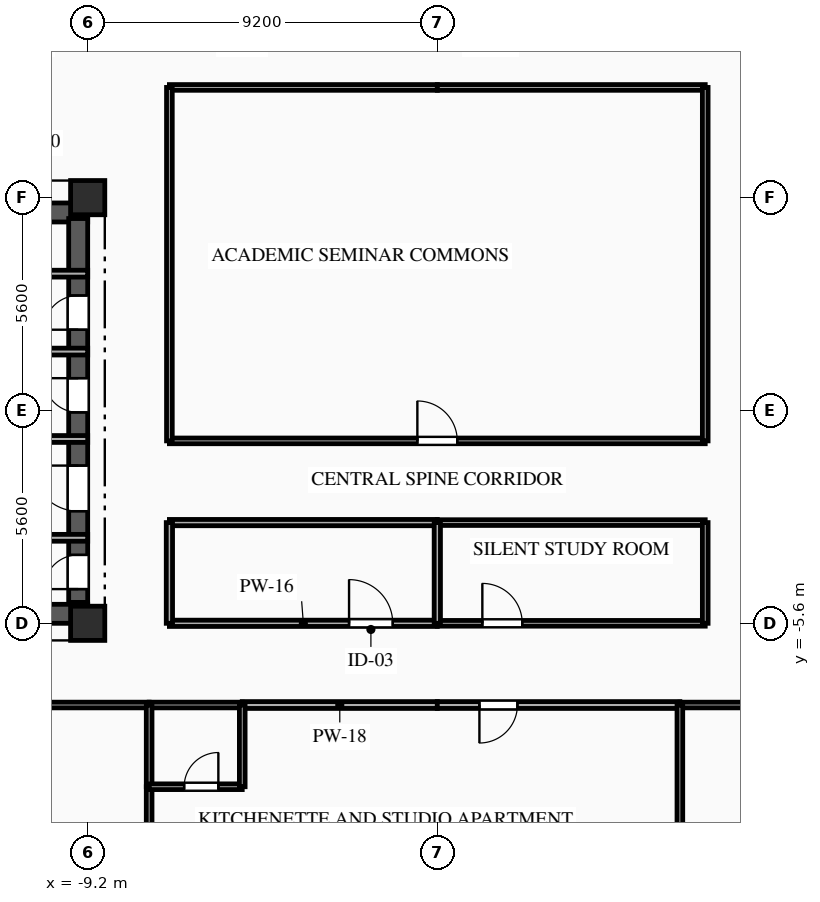
"""IFC4 building model, lengths in metres.
Left out: names, types, materials, properties, quantities, classifications, styles, units other than length and angle.
Written with IfcOpenShell. Run it as: python <this file> out.ifc"""

import sys

from ifc_helpers import new_model, si_unit, direction, frame, frame_2d, origin, origin_2d, place, context, subcontext, project, spatial, rectangle, extrude, element, fill, save


model = new_model("IFC4")
c1 = context("Model", 3, precision=1e-05, world=origin(), true_north=direction((0.0, 1.0)))
c2 = subcontext(c1, "Body", "Model", "MODEL_VIEW")
j1 = project(units=[si_unit("LENGTHUNIT", "METRE"), si_unit("PLANEANGLEUNIT", "RADIAN")], contexts=[c1])
p1 = place(None, origin())
s1 = spatial("IfcSite", under=j1, at=p1, CompositionType="ELEMENT")
p2 = place(p1, origin())
s2 = spatial("IfcBuilding", under=s1, at=p2, CompositionType="ELEMENT")
p3 = place(p2, frame((0.0, 0.0, 164.5)))
s3 = spatial("IfcBuildingStorey", under=s2, at=p3, CompositionType="ELEMENT", Elevation=164.5)
for number, where, z_axis, x_axis in (
    (1, (-9.2, -5.6, 0.0), (0.0, 0.0, 1.0), (1.0, 0.0, 0.0)),
    (2, (-9.2, 5.6, 0.0), (0.0, 0.0, 1.0), (1.0, 0.0, 0.0)),
):
    element("IfcColumn", number, at=place(p3, frame(where, z_axis=z_axis, x_axis=x_axis)), inside=s3, PredefinedType="COLUMN", context=c2, shape_type="SweptSolid", body=[
        extrude(rectangle(XDim=0.9, YDim=0.9, at=origin_2d()), origin(), (0.0, 0.0, 1.0), 3.35),
    ])
p4 = place(p3, frame((-18.8, 5.21, 0.0), z_axis=(0.0, 0.0, 1.0), x_axis=(1.0, 0.0, 0.0)))
e3 = element("IfcWall", 3, at=p4, inside=s3, PredefinedType="SHEAR", context=c2, shape_type="SweptSolid", body=[
    extrude(rectangle(XDim=9.6, YDim=0.5, at=frame_2d((4.8, 0.0))), origin(), (0.0, 0.0, 1.0), 3.04),
])
p5 = place(p4, frame((1.55, 0.0, 0.0)))
e4 = element("IfcOpeningElement", 4, at=p5, cuts=e3, PredefinedType="OPENING", context=c2, shape_type="SweptSolid", body=[
    extrude(rectangle(XDim=1.1, YDim=2.15, at=frame_2d((0.55, 1.075))), frame((0.0, 0.26, 0.0), z_axis=(0.0, -1.0, 0.0), x_axis=(1.0, 0.0, 0.0)), (0.0, 0.0, 1.0), 0.52),
])
p6 = place(p4, frame((4.775, 0.0, 0.0)))
e5 = element("IfcOpeningElement", 5, at=p6, cuts=e3, PredefinedType="OPENING", context=c2, shape_type="SweptSolid", body=[
    extrude(rectangle(XDim=1.05, YDim=2.1, at=frame_2d((0.525, 1.05))), frame((0.0, 0.26, 0.0), z_axis=(0.0, -1.0, 0.0), x_axis=(1.0, 0.0, 0.0)), (0.0, 0.0, 1.0), 0.52),
])
p7 = place(p3, frame((-18.8, -5.35, 0.0), z_axis=(0.0, 0.0, 1.0), x_axis=(1.0, 0.0, 0.0)))
e6 = element("IfcWall", 6, at=p7, inside=s3, PredefinedType="SHEAR", context=c2, shape_type="SweptSolid", body=[
    extrude(rectangle(XDim=9.6, YDim=0.5, at=frame_2d((4.8, 0.0))), origin(), (0.0, 0.0, 1.0), 3.04),
])
p8 = place(p7, frame((1.05, 0.0, 0.0)))
e7 = element("IfcOpeningElement", 7, at=p8, cuts=e6, PredefinedType="OPENING", context=c2, shape_type="SweptSolid", body=[
    extrude(rectangle(XDim=0.9, YDim=2.1, at=frame_2d((0.45, 1.05))), frame((0.0, 0.26, 0.0), z_axis=(0.0, -1.0, 0.0), x_axis=(1.0, 0.0, 0.0)), (0.0, 0.0, 1.0), 0.52),
])
p9 = place(p3, frame((-9.45, -5.05, 0.0), z_axis=(0.0, 0.0, 1.0), x_axis=(0.0, 1.0, 0.0)))
e8 = element("IfcWall", 8, at=p9, inside=s3, PredefinedType="SHEAR", context=c2, shape_type="SweptSolid", body=[
    extrude(rectangle(XDim=10.1, YDim=0.5, at=frame_2d((5.05, 0.0))), origin(), (0.0, 0.0, 1.0), 3.04),
])
p10 = place(p9, frame((7.175, 0.0, 0.0)))
e9 = element("IfcOpeningElement", 9, at=p10, cuts=e8, PredefinedType="OPENING", context=c2, shape_type="SweptSolid", body=[
    extrude(rectangle(XDim=0.9, YDim=2.1, at=frame_2d((0.45, 1.05))), frame((0.0, 0.26, 0.0), z_axis=(0.0, -1.0, 0.0), x_axis=(1.0, 0.0, 0.0)), (0.0, 0.0, 1.0), 0.52),
])
p11 = place(p9, frame((2.4, 0.0, 0.0)))
e10 = element("IfcOpeningElement", 10, at=p11, cuts=e8, PredefinedType="OPENING", context=c2, shape_type="SweptSolid", body=[
    extrude(rectangle(XDim=1.2, YDim=2.15, at=frame_2d((0.6, 1.075))), frame((0.0, 0.26, 0.0), z_axis=(0.0, -1.0, 0.0), x_axis=(1.0, 0.0, 0.0)), (0.0, 0.0, 1.0), 0.52),
])
p12 = place(p9, frame((0.35, 0.0, 0.0)))
e11 = element("IfcOpeningElement", 11, at=p12, cuts=e8, PredefinedType="OPENING", context=c2, shape_type="SweptSolid", body=[
    extrude(rectangle(XDim=0.9, YDim=2.1, at=frame_2d((0.45, 1.05))), frame((0.0, 0.26, 0.0), z_axis=(0.0, -1.0, 0.0), x_axis=(1.0, 0.0, 0.0)), (0.0, 0.0, 1.0), 0.52),
])
p13 = place(p9, frame((5.0, 0.0, 0.0)))
e12 = element("IfcOpeningElement", 12, at=p13, cuts=e8, PredefinedType="OPENING", context=c2, shape_type="SweptSolid", body=[
    extrude(rectangle(XDim=0.9, YDim=2.1, at=frame_2d((0.45, 1.05))), frame((0.0, 0.26, 0.0), z_axis=(0.0, -1.0, 0.0), x_axis=(1.0, 0.0, 0.0)), (0.0, 0.0, 1.0), 0.52),
])
p14 = place(p3, frame((-9.2, 3.6, 0.0), z_axis=(0.0, 0.0, 1.0), x_axis=(-1.0, 0.0, 0.0)))
e13 = element("IfcWall", 13, at=p14, inside=s3, PredefinedType="PARTITIONING", context=c2, shape_type="SweptSolid", body=[
    extrude(rectangle(XDim=2.95, YDim=0.18, at=frame_2d((1.475, 0.0))), origin(), (0.0, 0.0, 1.0), 3.04),
])
p15 = place(p14, frame((1.7, 0.0, 0.0)))
e14 = element("IfcOpeningElement", 14, at=p15, cuts=e13, PredefinedType="OPENING", context=c2, shape_type="SweptSolid", body=[
    extrude(rectangle(XDim=0.9, YDim=2.1, at=frame_2d((0.45, 1.05))), frame((0.0, 0.1, 0.0), z_axis=(0.0, -1.0, 0.0), x_axis=(1.0, 0.0, 0.0)), (0.0, 0.0, 1.0), 0.2),
])
p16 = place(p3, frame((-12.15, 1.55, 0.0), z_axis=(0.0, 0.0, 1.0), x_axis=(1.0, 0.0, 0.0)))
e15 = element("IfcWall", 15, at=p16, inside=s3, PredefinedType="PARTITIONING", context=c2, shape_type="SweptSolid", body=[
    extrude(rectangle(XDim=2.95, YDim=0.18, at=frame_2d((1.475, 0.0))), origin(), (0.0, 0.0, 1.0), 3.04),
])
p17 = place(p3, frame((-15.05, -3.35, 0.0), z_axis=(0.0, 0.0, 1.0), x_axis=(1.0, 0.0, 0.0)))
e16 = element("IfcWall", 16, at=p17, inside=s3, PredefinedType="PARTITIONING", context=c2, shape_type="SweptSolid", body=[
    extrude(rectangle(XDim=5.85, YDim=0.18, at=frame_2d((2.925, 0.0))), origin(), (0.0, 0.0, 1.0), 2.755),
])
p18 = place(p3, frame((-9.2, -0.75, 0.0), z_axis=(0.0, 0.0, 1.0), x_axis=(-1.0, 0.0, 0.0)))
e17 = element("IfcWall", 17, at=p18, inside=s3, PredefinedType="PARTITIONING", context=c2, shape_type="SweptSolid", body=[
    extrude(rectangle(XDim=5.85, YDim=0.18, at=frame_2d((2.925, 0.0))), origin(), (0.0, 0.0, 1.0), 3.04),
])
for number, where, z_axis, x_axis in (
    (18, (0.0, 8.5, 0.0), (0.0, 0.0, 1.0), (-1.0, 0.0, 0.0)),
    (19, (7.05, 8.5, 0.0), (0.0, 0.0, 1.0), (-1.0, 0.0, 0.0)),
):
    element("IfcWall", number, at=place(p3, frame(where, z_axis=z_axis, x_axis=x_axis)), inside=s3, PredefinedType="PARTITIONING", context=c2, shape_type="SweptSolid", body=[
        extrude(rectangle(XDim=7.05, YDim=0.15, at=frame_2d((3.525, 0.0))), origin(), (0.0, 0.0, 1.0), 3.04),
    ])
p19 = place(p3, frame((-7.583, -7.75, 0.0), z_axis=(0.0, 0.0, 1.0), x_axis=(-1.0, 0.0, 0.0)))
e20 = element("IfcWall", 20, at=p19, inside=s3, PredefinedType="PARTITIONING", context=c2, shape_type="SweptSolid", body=[
    extrude(rectangle(XDim=6.684, YDim=0.15, at=frame_2d((3.342, 0.0))), origin(), (0.0, 0.0, 1.0), 3.04),
])
p20 = place(p19, frame((4.494, 0.0, 0.0)))
e21 = element("IfcOpeningElement", 21, at=p20, cuts=e20, PredefinedType="OPENING", context=c2, shape_type="SweptSolid", body=[
    extrude(rectangle(XDim=1.05, YDim=2.15, at=frame_2d((0.525, 1.075))), frame((0.0, 0.085, 0.0), z_axis=(0.0, -1.0, 0.0), x_axis=(1.0, 0.0, 0.0)), (0.0, 0.0, 1.0), 0.17),
])
p21 = place(p3, frame((0.0, -7.75, 0.0), z_axis=(0.0, 0.0, 1.0), x_axis=(-1.0, 0.0, 0.0)))
e22 = element("IfcWall", 22, at=p21, inside=s3, PredefinedType="PARTITIONING", context=c2, shape_type="SweptSolid", body=[
    extrude(rectangle(XDim=5.133, YDim=0.18, at=frame_2d((2.566, 0.0))), origin(), (0.0, 0.0, 1.0), 3.04),
])
p22 = place(p3, frame((-5.133, -7.75, 0.0), z_axis=(0.0, 0.0, 1.0), x_axis=(-1.0, 0.0, 0.0)))
e23 = element("IfcWall", 23, at=p22, inside=s3, PredefinedType="PLUMBINGWALL", context=c2, shape_type="SweptSolid", body=[
    extrude(rectangle(XDim=2.45, YDim=0.15, at=frame_2d((1.225, 0.0))), origin(), (0.0, 0.0, 1.0), 3.04),
])
p23 = place(p3, frame((-7.05, -5.6, 0.0), z_axis=(0.0, 0.0, 1.0), x_axis=(1.0, 0.0, 0.0)))
e24 = element("IfcWall", 24, at=p23, inside=s3, PredefinedType="PARTITIONING", context=c2, shape_type="SweptSolid", body=[
    extrude(rectangle(XDim=7.05, YDim=0.165, at=frame_2d((3.525, 0.0))), origin(), (0.0, 0.0, 1.0), 2.525),
])
p24 = place(p23, frame((4.728, 0.0, 0.0)))
e25 = element("IfcOpeningElement", 25, at=p24, cuts=e24, PredefinedType="OPENING", context=c2, shape_type="SweptSolid", body=[
    extrude(rectangle(XDim=1.15, YDim=2.15, at=frame_2d((0.575, 1.075))), frame((0.0, 0.093, 0.0), z_axis=(0.0, -1.0, 0.0), x_axis=(1.0, 0.0, 0.0)), (0.0, 0.0, 1.0), 0.185),
])
p25 = place(p3, frame((6.383, -7.75, 0.0), z_axis=(0.0, 0.0, 1.0), x_axis=(-1.0, 0.0, 0.0)))
e26 = element("IfcWall", 26, at=p25, inside=s3, PredefinedType="PARTITIONING", context=c2, shape_type="SweptSolid", body=[
    extrude(rectangle(XDim=6.383, YDim=0.18, at=frame_2d((3.191, 0.0))), origin(), (0.0, 0.0, 1.0), 3.04),
])
p26 = place(p25, frame((4.275, 0.0, 0.0)))
e27 = element("IfcOpeningElement", 27, at=p26, cuts=e26, PredefinedType="OPENING", context=c2, shape_type="SweptSolid", body=[
    extrude(rectangle(XDim=1.0, YDim=2.15, at=frame_2d((0.5, 1.075))), frame((0.0, 0.1, 0.0), z_axis=(0.0, -1.0, 0.0), x_axis=(1.0, 0.0, 0.0)), (0.0, 0.0, 1.0), 0.2),
])
p27 = place(p3, frame((13.667, -7.75, 0.0), z_axis=(0.0, 0.0, 1.0), x_axis=(-1.0, 0.0, 0.0)))
e28 = element("IfcWall", 28, at=p27, inside=s3, PredefinedType="PARTITIONING", context=c2, shape_type="SweptSolid", body=[
    extrude(rectangle(XDim=7.283, YDim=0.15, at=frame_2d((3.642, 0.0))), origin(), (0.0, 0.0, 1.0), 3.04),
])
p28 = place(p27, frame((1.214, 0.0, 0.0)))
e29 = element("IfcOpeningElement", 29, at=p28, cuts=e28, PredefinedType="OPENING", context=c2, shape_type="SweptSolid", body=[
    extrude(rectangle(XDim=1.05, YDim=2.15, at=frame_2d((0.525, 1.075))), frame((0.0, 0.085, 0.0), z_axis=(0.0, -1.0, 0.0), x_axis=(1.0, 0.0, 0.0)), (0.0, 0.0, 1.0), 0.17),
])
p29 = place(p3, frame((0.0, -5.6, 0.0), z_axis=(0.0, 0.0, 1.0), x_axis=(1.0, 0.0, 0.0)))
e30 = element("IfcWall", 30, at=p29, inside=s3, PredefinedType="PARTITIONING", context=c2, shape_type="SweptSolid", body=[
    extrude(rectangle(XDim=7.05, YDim=0.15, at=frame_2d((3.525, 0.0))), origin(), (0.0, 0.0, 1.0), 2.525),
])
p30 = place(p29, frame((1.185, 0.0, 0.0)))
e31 = element("IfcOpeningElement", 31, at=p30, cuts=e30, PredefinedType="OPENING", context=c2, shape_type="SweptSolid", body=[
    extrude(rectangle(XDim=1.05, YDim=2.15, at=frame_2d((0.525, 1.075))), frame((0.0, 0.085, 0.0), z_axis=(0.0, -1.0, 0.0), x_axis=(1.0, 0.0, 0.0)), (0.0, 0.0, 1.0), 0.17),
])
p31 = place(p3, frame((-7.05, -0.8, 0.0), z_axis=(0.0, 0.0, 1.0), x_axis=(1.0, 0.0, 0.0)))
e32 = element("IfcWall", 32, at=p31, inside=s3, PredefinedType="PARTITIONING", context=c2, shape_type="SweptSolid", body=[
    extrude(rectangle(XDim=14.1, YDim=0.15, at=frame_2d((7.05, 0.0))), origin(), (0.0, 0.0, 1.0), 3.04),
])
p32 = place(p31, frame((6.525, 0.0, 0.0)))
e33 = element("IfcOpeningElement", 33, at=p32, cuts=e32, PredefinedType="OPENING", context=c2, shape_type="SweptSolid", body=[
    extrude(rectangle(XDim=1.05, YDim=2.15, at=frame_2d((0.525, 1.075))), frame((0.0, 0.085, 0.0), z_axis=(0.0, -1.0, 0.0), x_axis=(1.0, 0.0, 0.0)), (0.0, 0.0, 1.0), 0.17),
])
p33 = place(p3, frame((0.0, -2.95, 0.0), z_axis=(0.0, 0.0, 1.0), x_axis=(-1.0, 0.0, 0.0)))
e34 = element("IfcWall", 34, at=p33, inside=s3, PredefinedType="PARTITIONING", context=c2, shape_type="SweptSolid", body=[
    extrude(rectangle(XDim=7.05, YDim=0.165, at=frame_2d((3.525, 0.0))), origin(), (0.0, 0.0, 1.0), 3.04),
])
p34 = place(p3, frame((7.05, -2.95, 0.0), z_axis=(0.0, 0.0, 1.0), x_axis=(-1.0, 0.0, 0.0)))
e35 = element("IfcWall", 35, at=p34, inside=s3, PredefinedType="PARTITIONING", context=c2, shape_type="SweptSolid", body=[
    extrude(rectangle(XDim=7.05, YDim=0.15, at=frame_2d((3.525, 0.0))), origin(), (0.0, 0.0, 1.0), 3.04),
])
p35 = place(p3, frame((-7.05, 8.5, 0.0), z_axis=(0.0, 0.0, 1.0), x_axis=(0.0, -1.0, 0.0)))
e36 = element("IfcWall", 36, at=p35, inside=s3, PredefinedType="PARTITIONING", context=c2, shape_type="SweptSolid", body=[
    extrude(rectangle(XDim=9.3, YDim=0.15, at=frame_2d((4.65, 0.0))), origin(), (0.0, 0.0, 1.0), 3.04),
])
p36 = place(p3, frame((-7.05, -2.95, 0.0), z_axis=(0.0, 0.0, 1.0), x_axis=(0.0, -1.0, 0.0)))
e37 = element("IfcWall", 37, at=p36, inside=s3, PredefinedType="PARTITIONING", context=c2, shape_type="SweptSolid", body=[
    extrude(rectangle(XDim=2.65, YDim=0.165, at=frame_2d((1.325, 0.0))), origin(), (0.0, 0.0, 1.0), 3.04),
])
p37 = place(p3, frame((7.05, -0.8, 0.0), z_axis=(0.0, 0.0, 1.0), x_axis=(0.0, 1.0, 0.0)))
e38 = element("IfcWall", 38, at=p37, inside=s3, PredefinedType="PARTITIONING", context=c2, shape_type="SweptSolid", body=[
    extrude(rectangle(XDim=9.3, YDim=0.15, at=frame_2d((4.65, 0.0))), origin(), (0.0, 0.0, 1.0), 3.04),
])
p38 = place(p3, frame((7.05, -5.6, 0.0), z_axis=(0.0, 0.0, 1.0), x_axis=(0.0, 1.0, 0.0)))
e39 = element("IfcWall", 39, at=p38, inside=s3, PredefinedType="PARTITIONING", context=c2, shape_type="SweptSolid", body=[
    extrude(rectangle(XDim=2.65, YDim=0.15, at=frame_2d((1.325, 0.0))), origin(), (0.0, 0.0, 1.0), 3.04),
])
p39 = place(p3, frame((-7.583, -9.9, 0.0), z_axis=(0.0, 0.0, 1.0), x_axis=(0.0, -1.0, 0.0)))
e40 = element("IfcWall", 40, at=p39, inside=s3, PredefinedType="PARTITIONING", context=c2, shape_type="SweptSolid", body=[
    extrude(rectangle(XDim=5.7, YDim=0.15, at=frame_2d((2.85, 0.0))), origin(), (0.0, 0.0, 1.0), 3.04),
])
p40 = place(p3, frame((-7.583, -7.75, 0.0), z_axis=(0.0, 0.0, 1.0), x_axis=(0.0, -1.0, 0.0)))
e41 = element("IfcWall", 41, at=p40, inside=s3, PredefinedType="PLUMBINGWALL", context=c2, shape_type="SweptSolid", body=[
    extrude(rectangle(XDim=2.15, YDim=0.15, at=frame_2d((1.075, 0.0))), origin(), (0.0, 0.0, 1.0), 3.04),
])
p41 = place(p3, frame((-7.583, -9.9, 0.0), z_axis=(0.0, 0.0, 1.0), x_axis=(1.0, 0.0, 0.0)))
e42 = element("IfcWall", 42, at=p41, inside=s3, PredefinedType="PLUMBINGWALL", context=c2, shape_type="SweptSolid", body=[
    extrude(rectangle(XDim=2.45, YDim=0.15, at=frame_2d((1.225, 0.0))), origin(), (0.0, 0.0, 1.0), 3.04),
])
p42 = place(p41, frame((0.921, 0.0, 0.0)))
e43 = element("IfcOpeningElement", 43, at=p42, cuts=e42, PredefinedType="OPENING", context=c2, shape_type="SweptSolid", body=[
    extrude(rectangle(XDim=0.9, YDim=2.1, at=frame_2d((0.45, 1.05))), frame((0.0, 0.085, 0.0), z_axis=(0.0, -1.0, 0.0), x_axis=(1.0, 0.0, 0.0)), (0.0, 0.0, 1.0), 0.17),
])
p43 = place(p3, frame((-5.133, -9.9, 0.0), z_axis=(0.0, 0.0, 1.0), x_axis=(0.0, 1.0, 0.0)))
e44 = element("IfcWall", 44, at=p43, inside=s3, PredefinedType="PLUMBINGWALL", context=c2, shape_type="SweptSolid", body=[
    extrude(rectangle(XDim=2.15, YDim=0.15, at=frame_2d((1.075, 0.0))), origin(), (0.0, 0.0, 1.0), 3.04),
])
p44 = place(p3, frame((6.383, -7.75, 0.0), z_axis=(0.0, 0.0, 1.0), x_axis=(0.0, -1.0, 0.0)))
e45 = element("IfcWall", 45, at=p44, inside=s3, PredefinedType="PARTITIONING", context=c2, shape_type="SweptSolid", body=[
    extrude(rectangle(XDim=7.85, YDim=0.15, at=frame_2d((3.925, 0.0))), origin(), (0.0, 0.0, 1.0), 3.04),
])
p45 = place(p3, frame((0.0, -2.95, 0.0), z_axis=(0.0, 0.0, 1.0), x_axis=(0.0, -1.0, 0.0)))
e46 = element("IfcWall", 46, at=p45, inside=s3, PredefinedType="PARTITIONING", context=c2, shape_type="SweptSolid", body=[
    extrude(rectangle(XDim=2.65, YDim=0.165, at=frame_2d((1.325, 0.0))), origin(), (0.0, 0.0, 1.0), 3.04),
])
p46 = place(p10, origin())
e47 = element("IfcDoor", 47, at=p46, inside=s3, OperationType="SINGLE_SWING_LEFT", PredefinedType="DOOR", context=c2, shape_type="SweptSolid", body=[
    extrude(rectangle(XDim=0.9, YDim=2.1, at=frame_2d((0.45, 1.05))), frame((0.0, 0.025, 0.0), z_axis=(0.0, -1.0, 0.0), x_axis=(1.0, 0.0, 0.0)), (0.0, 0.0, 1.0), 0.05),
])
fill(e9, e47)
p47 = place(p11, origin())
e48 = element("IfcDoor", 48, at=p47, inside=s3, OperationType="SINGLE_SWING_RIGHT", PredefinedType="DOOR", context=c2, shape_type="SweptSolid", body=[
    extrude(rectangle(XDim=1.2, YDim=2.15, at=frame_2d((0.6, 1.075))), frame((0.0, 0.025, 0.0), z_axis=(0.0, -1.0, 0.0), x_axis=(1.0, 0.0, 0.0)), (0.0, 0.0, 1.0), 0.05),
])
fill(e10, e48)
p48 = place(p12, origin())
e49 = element("IfcDoor", 49, at=p48, inside=s3, OperationType="SINGLE_SWING_LEFT", PredefinedType="DOOR", context=c2, shape_type="SweptSolid", body=[
    extrude(rectangle(XDim=0.9, YDim=2.1, at=frame_2d((0.45, 1.05))), frame((0.0, 0.025, 0.0), z_axis=(0.0, -1.0, 0.0), x_axis=(1.0, 0.0, 0.0)), (0.0, 0.0, 1.0), 0.05),
])
fill(e11, e49)
p49 = place(p13, origin())
e50 = element("IfcDoor", 50, at=p49, inside=s3, OperationType="SINGLE_SWING_RIGHT", PredefinedType="DOOR", context=c2, shape_type="SweptSolid", body=[
    extrude(rectangle(XDim=0.9, YDim=2.1, at=frame_2d((0.45, 1.05))), frame((0.0, 0.025, 0.0), z_axis=(0.0, -1.0, 0.0), x_axis=(1.0, 0.0, 0.0)), (0.0, 0.0, 1.0), 0.05),
])
fill(e12, e50)
p50 = place(p24, origin())
e51 = element("IfcDoor", 51, at=p50, inside=s3, OperationType="SINGLE_SWING_LEFT", PredefinedType="DOOR", context=c2, shape_type="SweptSolid", body=[
    extrude(rectangle(XDim=1.15, YDim=2.15, at=frame_2d((0.575, 1.075))), frame((0.0, 0.025, 0.0), z_axis=(0.0, -1.0, 0.0), x_axis=(1.0, 0.0, 0.0)), (0.0, 0.0, 1.0), 0.05),
])
fill(e25, e51)
p51 = place(p26, origin())
e52 = element("IfcDoor", 52, at=p51, inside=s3, OperationType="SINGLE_SWING_RIGHT", PredefinedType="DOOR", context=c2, shape_type="SweptSolid", body=[
    extrude(rectangle(XDim=1.0, YDim=2.15, at=frame_2d((0.5, 1.075))), frame((0.0, 0.025, 0.0), z_axis=(0.0, -1.0, 0.0), x_axis=(1.0, 0.0, 0.0)), (0.0, 0.0, 1.0), 0.05),
])
fill(e27, e52)
p52 = place(p30, origin())
e53 = element("IfcDoor", 53, at=p52, inside=s3, OperationType="SINGLE_SWING_LEFT", PredefinedType="DOOR", context=c2, shape_type="SweptSolid", body=[
    extrude(rectangle(XDim=1.05, YDim=2.15, at=frame_2d((0.525, 1.075))), frame((0.0, 0.025, 0.0), z_axis=(0.0, -1.0, 0.0), x_axis=(1.0, 0.0, 0.0)), (0.0, 0.0, 1.0), 0.05),
])
fill(e31, e53)
p53 = place(p32, origin())
e54 = element("IfcDoor", 54, at=p53, inside=s3, OperationType="SINGLE_SWING_LEFT", PredefinedType="DOOR", context=c2, shape_type="SweptSolid", body=[
    extrude(rectangle(XDim=1.05, YDim=2.15, at=frame_2d((0.525, 1.075))), frame((0.0, 0.025, 0.0), z_axis=(0.0, -1.0, 0.0), x_axis=(1.0, 0.0, 0.0)), (0.0, 0.0, 1.0), 0.05),
])
fill(e33, e54)
p54 = place(p42, origin())
e55 = element("IfcDoor", 55, at=p54, inside=s3, OperationType="SINGLE_SWING_RIGHT", PredefinedType="DOOR", context=c2, shape_type="SweptSolid", body=[
    extrude(rectangle(XDim=0.9, YDim=2.1, at=frame_2d((0.45, 1.05))), frame((0.0, 0.025, 0.0), z_axis=(0.0, -1.0, 0.0), x_axis=(1.0, 0.0, 0.0)), (0.0, 0.0, 1.0), 0.05),
])
fill(e43, e55)
save(model, sys.argv[1])
